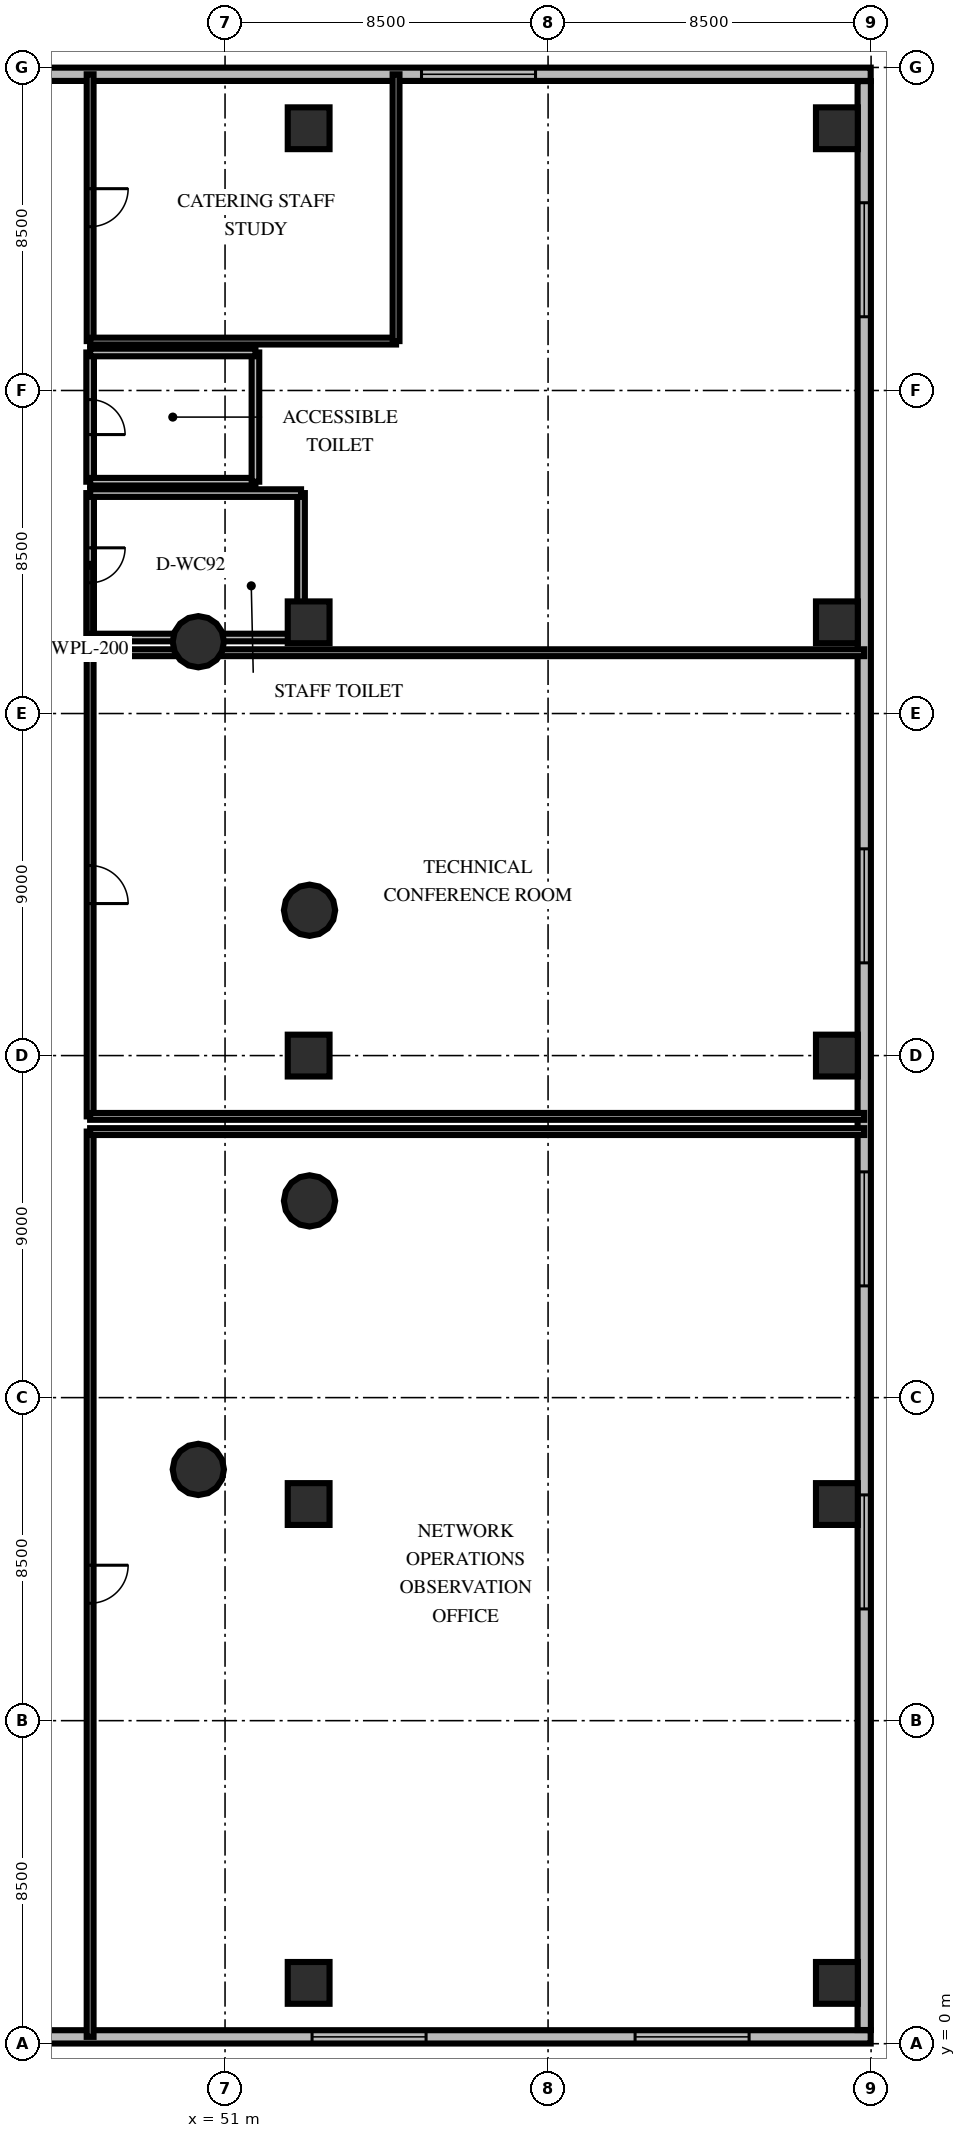
"""IFC4 building model, lengths in metres.
Left out: names, types, materials, properties, quantities, classifications, styles, units other than length and angle.
Written with IfcOpenShell. Run it as: python <this file> out.ifc"""

import sys

from ifc_helpers import new_model, si_unit, direction, frame, frame_2d, origin, origin_2d, place, context, subcontext, project, spatial, rectangle, circle, extrude, element, fill, save


model = new_model("IFC4")
c1 = context("Model", 3, precision=1e-05, world=origin(), true_north=direction((0.0, 1.0)))
c2 = subcontext(c1, "Body", "Model", "MODEL_VIEW")
j1 = project(units=[si_unit("LENGTHUNIT", "METRE"), si_unit("PLANEANGLEUNIT", "RADIAN")], contexts=[c1])
p1 = place(None, origin())
s1 = spatial("IfcSite", under=j1, at=p1, CompositionType="ELEMENT")
p2 = place(p1, origin())
s2 = spatial("IfcBuilding", under=s1, at=p2, CompositionType="ELEMENT")
p3 = place(p2, frame((0.0, 0.0, 5.4)))
s3 = spatial("IfcBuildingStorey", under=s2, at=p3, CompositionType="ELEMENT", Elevation=5.4)
for number, where, z_axis, x_axis in (
    (1, (53.2, 1.6, 0.0), (0.0, 0.0, 1.0), (1.0, 0.0, 0.0)),
    (2, (53.2, 14.2, 0.0), (0.0, 0.0, 1.0), (1.0, 0.0, 0.0)),
    (3, (53.2, 26.0, 0.0), (0.0, 0.0, 1.0), (1.0, 0.0, 0.0)),
    (4, (53.2, 37.4, 0.0), (0.0, 0.0, 1.0), (1.0, 0.0, 0.0)),
    (5, (53.2, 50.4, 0.0), (0.0, 0.0, 1.0), (1.0, 0.0, 0.0)),
    (6, (67.1, 1.6, 0.0), (0.0, 0.0, 1.0), (1.0, 0.0, 0.0)),
    (7, (67.1, 14.2, 0.0), (0.0, 0.0, 1.0), (1.0, 0.0, 0.0)),
    (8, (67.1, 26.0, 0.0), (0.0, 0.0, 1.0), (1.0, 0.0, 0.0)),
    (9, (67.1, 37.4, 0.0), (0.0, 0.0, 1.0), (1.0, 0.0, 0.0)),
    (10, (67.1, 50.4, 0.0), (0.0, 0.0, 1.0), (1.0, 0.0, 0.0)),
):
    element("IfcColumn", number, at=place(p3, frame(where, z_axis=z_axis, x_axis=x_axis)), inside=s3, PredefinedType="COLUMN", context=c2, shape_type="SweptSolid", body=[
        extrude(rectangle(XDim=1.1, YDim=1.1, at=origin_2d()), origin(), (0.0, 0.0, 1.0), 4.8),
    ])
for number, where, z_axis, x_axis in (
    (11, (53.223, 29.824, 0.0), (0.0, 0.0, 1.0), (1.0, 0.0, 0.0)),
    (12, (50.297, 36.889, 0.0), (0.0, 0.0, 1.0), (1.0, 0.0, 0.0)),
    (13, (50.297, 15.111, 0.0), (0.0, 0.0, 1.0), (1.0, 0.0, 0.0)),
    (14, (53.223, 22.176, 0.0), (0.0, 0.0, 1.0), (1.0, 0.0, 0.0)),
):
    element("IfcColumn", number, at=place(p3, frame(where, z_axis=z_axis, x_axis=x_axis)), inside=s3, PredefinedType="COLUMN", context=c2, shape_type="SweptSolid", body=[
        extrude(circle(Radius=0.675, at=origin_2d()), origin(), (0.0, 0.0, 1.0), 4.8),
    ])
p4 = place(p3, frame((67.99, 0.18, 0.0), z_axis=(0.0, 0.0, 1.0), x_axis=(-1.0, 0.0, 0.0)))
e15 = element("IfcWall", 15, at=p4, inside=s3, PredefinedType="SOLIDWALL", context=c2, shape_type="SweptSolid", body=[
    extrude(rectangle(XDim=25.37, YDim=0.35, at=frame_2d((12.685, 0.0))), origin(), (0.0, 0.0, 1.0), 3.76),
])
p5 = place(p4, frame((3.2, 0.0, 0.85)))
e16 = element("IfcOpeningElement", 16, at=p5, cuts=e15, PredefinedType="OPENING", context=c2, shape_type="SweptSolid", body=[
    extrude(rectangle(XDim=3.0, YDim=2.4, at=frame_2d((1.5, 1.2))), frame((0.0, 0.185, 0.0), z_axis=(0.0, -1.0, 0.0), x_axis=(1.0, 0.0, 0.0)), (0.0, 0.0, 1.0), 0.37),
])
p6 = place(p4, frame((11.7, 0.0, 0.85)))
e17 = element("IfcOpeningElement", 17, at=p6, cuts=e15, PredefinedType="OPENING", context=c2, shape_type="SweptSolid", body=[
    extrude(rectangle(XDim=3.0, YDim=2.4, at=frame_2d((1.5, 1.2))), frame((0.0, 0.185, 0.0), z_axis=(0.0, -1.0, 0.0), x_axis=(1.0, 0.0, 0.0)), (0.0, 0.0, 1.0), 0.37),
])
p7 = place(p3, frame((67.82, 51.64, 0.0), z_axis=(0.0, 0.0, 1.0), x_axis=(0.0, -1.0, 0.0)))
e18 = element("IfcWall", 18, at=p7, inside=s3, PredefinedType="SOLIDWALL", context=c2, shape_type="SweptSolid", body=[
    extrude(rectangle(XDim=51.28, YDim=0.35, at=frame_2d((25.64, 0.0))), origin(), (0.0, 0.0, 1.0), 3.76),
])
p8 = place(p7, frame((3.2, 0.0, 0.85)))
e19 = element("IfcOpeningElement", 19, at=p8, cuts=e18, PredefinedType="OPENING", context=c2, shape_type="SweptSolid", body=[
    extrude(rectangle(XDim=3.0, YDim=2.4, at=frame_2d((1.5, 1.2))), frame((0.0, 0.185, 0.0), z_axis=(0.0, -1.0, 0.0), x_axis=(1.0, 0.0, 0.0)), (0.0, 0.0, 1.0), 0.37),
])
p9 = place(p7, frame((20.2, 0.0, 0.85)))
e20 = element("IfcOpeningElement", 20, at=p9, cuts=e18, PredefinedType="OPENING", context=c2, shape_type="SweptSolid", body=[
    extrude(rectangle(XDim=3.0, YDim=2.4, at=frame_2d((1.5, 1.2))), frame((0.0, 0.185, 0.0), z_axis=(0.0, -1.0, 0.0), x_axis=(1.0, 0.0, 0.0)), (0.0, 0.0, 1.0), 0.37),
])
p10 = place(p7, frame((28.7, 0.0, 0.85)))
e21 = element("IfcOpeningElement", 21, at=p10, cuts=e18, PredefinedType="OPENING", context=c2, shape_type="SweptSolid", body=[
    extrude(rectangle(XDim=3.0, YDim=2.4, at=frame_2d((1.5, 1.2))), frame((0.0, 0.185, 0.0), z_axis=(0.0, -1.0, 0.0), x_axis=(1.0, 0.0, 0.0)), (0.0, 0.0, 1.0), 0.37),
])
p11 = place(p7, frame((37.2, 0.0, 0.85)))
e22 = element("IfcOpeningElement", 22, at=p11, cuts=e18, PredefinedType="OPENING", context=c2, shape_type="SweptSolid", body=[
    extrude(rectangle(XDim=3.0, YDim=2.4, at=frame_2d((1.5, 1.2))), frame((0.0, 0.185, 0.0), z_axis=(0.0, -1.0, 0.0), x_axis=(1.0, 0.0, 0.0)), (0.0, 0.0, 1.0), 0.37),
])
p12 = place(p3, frame((42.62, 51.82, 0.0), z_axis=(0.0, 0.0, 1.0), x_axis=(1.0, 0.0, 0.0)))
e23 = element("IfcWall", 23, at=p12, inside=s3, PredefinedType="SOLIDWALL", context=c2, shape_type="SweptSolid", body=[
    extrude(rectangle(XDim=25.37, YDim=0.35, at=frame_2d((12.685, 0.0))), origin(), (0.0, 0.0, 1.0), 3.76),
])
p13 = place(p12, frame((13.55, 0.0, 0.85)))
e24 = element("IfcOpeningElement", 24, at=p13, cuts=e23, PredefinedType="OPENING", context=c2, shape_type="SweptSolid", body=[
    extrude(rectangle(XDim=3.0, YDim=2.4, at=frame_2d((1.5, 1.2))), frame((0.0, 0.185, 0.0), z_axis=(0.0, -1.0, 0.0), x_axis=(1.0, 0.0, 0.0)), (0.0, 0.0, 1.0), 0.37),
])
p14 = place(p3, frame((47.45, 24.0, 0.0), z_axis=(0.0, 0.0, 1.0), x_axis=(0.0, -1.0, 0.0)))
e25 = element("IfcWall", 25, at=p14, inside=s3, PredefinedType="PARTITIONING", context=c2, shape_type="SweptSolid", body=[
    extrude(rectangle(XDim=23.82, YDim=0.18, at=frame_2d((11.91, 0.0))), origin(), (0.0, 0.0, 1.0), 3.56),
])
p15 = place(p14, frame((11.41, 0.0, 0.0)))
e26 = element("IfcOpeningElement", 26, at=p15, cuts=e25, PredefinedType="OPENING", context=c2, shape_type="SweptSolid", body=[
    extrude(rectangle(XDim=1.0, YDim=2.15, at=frame_2d((0.5, 1.075))), frame((0.0, 0.1, 0.0), z_axis=(0.0, -1.0, 0.0), x_axis=(1.0, 0.0, 0.0)), (0.0, 0.0, 1.0), 0.2),
])
p16 = place(p3, frame((67.82, 24.0, 0.0), z_axis=(0.0, 0.0, 1.0), x_axis=(-1.0, 0.0, 0.0)))
e27 = element("IfcWall", 27, at=p16, inside=s3, PredefinedType="PARTITIONING", context=c2, shape_type="SweptSolid", body=[
    extrude(rectangle(XDim=20.37, YDim=0.18, at=frame_2d((10.185, 0.0))), origin(), (0.0, 0.0, 1.0), 3.56),
])
p17 = place(p3, frame((47.45, 36.6, 0.0), z_axis=(0.0, 0.0, 1.0), x_axis=(0.0, -1.0, 0.0)))
e28 = element("IfcWall", 28, at=p17, inside=s3, PredefinedType="PARTITIONING", context=c2, shape_type="SweptSolid", body=[
    extrude(rectangle(XDim=12.2, YDim=0.18, at=frame_2d((6.1, 0.0))), origin(), (0.0, 0.0, 1.0), 3.56),
])
p18 = place(p17, frame((5.6, 0.0, 0.0)))
e29 = element("IfcOpeningElement", 29, at=p18, cuts=e28, PredefinedType="OPENING", context=c2, shape_type="SweptSolid", body=[
    extrude(rectangle(XDim=1.0, YDim=2.15, at=frame_2d((0.5, 1.075))), frame((0.0, 0.1, 0.0), z_axis=(0.0, -1.0, 0.0), x_axis=(1.0, 0.0, 0.0)), (0.0, 0.0, 1.0), 0.2),
])
for number, where, z_axis, x_axis in (
    (30, (47.45, 24.4, 0.0), (0.0, 0.0, 1.0), (1.0, 0.0, 0.0)),
    (31, (67.82, 36.6, 0.0), (0.0, 0.0, 1.0), (-1.0, 0.0, 0.0)),
):
    element("IfcWall", number, at=place(p3, frame(where, z_axis=z_axis, x_axis=x_axis)), inside=s3, PredefinedType="PARTITIONING", context=c2, shape_type="SweptSolid", body=[
        extrude(rectangle(XDim=20.37, YDim=0.18, at=frame_2d((10.185, 0.0))), origin(), (0.0, 0.0, 1.0), 3.56),
    ])
p19 = place(p3, frame((47.45, 40.8, 0.0), z_axis=(0.0, 0.0, 1.0), x_axis=(0.0, -1.0, 0.0)))
e32 = element("IfcWall", 32, at=p19, inside=s3, PredefinedType="PLUMBINGWALL", context=c2, shape_type="SweptSolid", body=[
    extrude(rectangle(XDim=3.8, YDim=0.2, at=frame_2d((1.9, 0.0))), origin(), (0.0, 0.0, 1.0), 3.56),
])
p20 = place(p19, frame((1.44, 0.0, 0.0)))
e33 = element("IfcOpeningElement", 33, at=p20, cuts=e32, PredefinedType="OPENING", context=c2, shape_type="SweptSolid", body=[
    extrude(rectangle(XDim=0.92, YDim=2.1, at=frame_2d((0.46, 1.05))), frame((0.0, 0.11, 0.0), z_axis=(0.0, -1.0, 0.0), x_axis=(1.0, 0.0, 0.0)), (0.0, 0.0, 1.0), 0.22),
])
p21 = place(p3, frame((47.45, 37.0, 0.0), z_axis=(0.0, 0.0, 1.0), x_axis=(1.0, 0.0, 0.0)))
e34 = element("IfcWall", 34, at=p21, inside=s3, PredefinedType="PLUMBINGWALL", context=c2, shape_type="SweptSolid", body=[
    extrude(rectangle(XDim=5.55, YDim=0.2, at=frame_2d((2.775, 0.0))), origin(), (0.0, 0.0, 1.0), 3.56),
])
p22 = place(p3, frame((53.0, 37.0, 0.0), z_axis=(0.0, 0.0, 1.0), x_axis=(0.0, 1.0, 0.0)))
e35 = element("IfcWall", 35, at=p22, inside=s3, PredefinedType="PLUMBINGWALL", context=c2, shape_type="SweptSolid", body=[
    extrude(rectangle(XDim=3.8, YDim=0.2, at=frame_2d((1.9, 0.0))), origin(), (0.0, 0.0, 1.0), 3.56),
])
p23 = place(p3, frame((53.0, 40.8, 0.0), z_axis=(0.0, 0.0, 1.0), x_axis=(-1.0, 0.0, 0.0)))
e36 = element("IfcWall", 36, at=p23, inside=s3, PredefinedType="PLUMBINGWALL", context=c2, shape_type="SweptSolid", body=[
    extrude(rectangle(XDim=5.55, YDim=0.2, at=frame_2d((2.775, 0.0))), origin(), (0.0, 0.0, 1.0), 3.56),
])
p24 = place(p3, frame((47.45, 44.5, 0.0), z_axis=(0.0, 0.0, 1.0), x_axis=(0.0, -1.0, 0.0)))
e37 = element("IfcWall", 37, at=p24, inside=s3, PredefinedType="PLUMBINGWALL", context=c2, shape_type="SweptSolid", body=[
    extrude(rectangle(XDim=3.4, YDim=0.2, at=frame_2d((1.7, 0.0))), origin(), (0.0, 0.0, 1.0), 3.56),
])
p25 = place(p24, frame((1.24, 0.0, 0.0)))
e38 = element("IfcOpeningElement", 38, at=p25, cuts=e37, PredefinedType="OPENING", context=c2, shape_type="SweptSolid", body=[
    extrude(rectangle(XDim=0.92, YDim=2.1, at=frame_2d((0.46, 1.05))), frame((0.0, 0.11, 0.0), z_axis=(0.0, -1.0, 0.0), x_axis=(1.0, 0.0, 0.0)), (0.0, 0.0, 1.0), 0.22),
])
p26 = place(p3, frame((47.45, 41.1, 0.0), z_axis=(0.0, 0.0, 1.0), x_axis=(1.0, 0.0, 0.0)))
e39 = element("IfcWall", 39, at=p26, inside=s3, PredefinedType="PLUMBINGWALL", context=c2, shape_type="SweptSolid", body=[
    extrude(rectangle(XDim=4.35, YDim=0.2, at=frame_2d((2.175, 0.0))), origin(), (0.0, 0.0, 1.0), 3.56),
])
p27 = place(p3, frame((51.8, 41.1, 0.0), z_axis=(0.0, 0.0, 1.0), x_axis=(0.0, 1.0, 0.0)))
e40 = element("IfcWall", 40, at=p27, inside=s3, PredefinedType="PLUMBINGWALL", context=c2, shape_type="SweptSolid", body=[
    extrude(rectangle(XDim=3.4, YDim=0.2, at=frame_2d((1.7, 0.0))), origin(), (0.0, 0.0, 1.0), 3.56),
])
p28 = place(p3, frame((51.8, 44.5, 0.0), z_axis=(0.0, 0.0, 1.0), x_axis=(-1.0, 0.0, 0.0)))
e41 = element("IfcWall", 41, at=p28, inside=s3, PredefinedType="PLUMBINGWALL", context=c2, shape_type="SweptSolid", body=[
    extrude(rectangle(XDim=4.35, YDim=0.2, at=frame_2d((2.175, 0.0))), origin(), (0.0, 0.0, 1.0), 3.56),
])
p29 = place(p3, frame((47.45, 51.82, 0.0), z_axis=(0.0, 0.0, 1.0), x_axis=(0.0, -1.0, 0.0)))
e42 = element("IfcWall", 42, at=p29, inside=s3, PredefinedType="PARTITIONING", context=c2, shape_type="SweptSolid", body=[
    extrude(rectangle(XDim=7.02, YDim=0.18, at=frame_2d((3.51, 0.0))), origin(), (0.0, 0.0, 1.0), 3.56),
])
p30 = place(p29, frame((3.01, 0.0, 0.0)))
e43 = element("IfcOpeningElement", 43, at=p30, cuts=e42, PredefinedType="OPENING", context=c2, shape_type="SweptSolid", body=[
    extrude(rectangle(XDim=1.0, YDim=2.15, at=frame_2d((0.5, 1.075))), frame((0.0, 0.1, 0.0), z_axis=(0.0, -1.0, 0.0), x_axis=(1.0, 0.0, 0.0)), (0.0, 0.0, 1.0), 0.2),
])
p31 = place(p3, frame((47.45, 44.8, 0.0), z_axis=(0.0, 0.0, 1.0), x_axis=(1.0, 0.0, 0.0)))
e44 = element("IfcWall", 44, at=p31, inside=s3, PredefinedType="PARTITIONING", context=c2, shape_type="SweptSolid", body=[
    extrude(rectangle(XDim=8.05, YDim=0.18, at=frame_2d((4.025, 0.0))), origin(), (0.0, 0.0, 1.0), 3.56),
])
p32 = place(p3, frame((55.5, 44.8, 0.0), z_axis=(0.0, 0.0, 1.0), x_axis=(0.0, 1.0, 0.0)))
e45 = element("IfcWall", 45, at=p32, inside=s3, PredefinedType="PARTITIONING", context=c2, shape_type="SweptSolid", body=[
    extrude(rectangle(XDim=7.02, YDim=0.18, at=frame_2d((3.51, 0.0))), origin(), (0.0, 0.0, 1.0), 3.56),
])
p33 = place(p5, origin())
e46 = element("IfcWindow", 46, at=p33, inside=s3, PartitioningType="SINGLE_PANEL", PredefinedType="WINDOW", context=c2, shape_type="SweptSolid", body=[
    extrude(rectangle(XDim=3.0, YDim=2.4, at=frame_2d((1.5, 1.2))), frame((0.0, 0.03, 0.0), z_axis=(0.0, -1.0, 0.0), x_axis=(1.0, 0.0, 0.0)), (0.0, 0.0, 1.0), 0.06),
])
fill(e16, e46)
p34 = place(p6, origin())
e47 = element("IfcWindow", 47, at=p34, inside=s3, PartitioningType="SINGLE_PANEL", PredefinedType="WINDOW", context=c2, shape_type="SweptSolid", body=[
    extrude(rectangle(XDim=3.0, YDim=2.4, at=frame_2d((1.5, 1.2))), frame((0.0, 0.03, 0.0), z_axis=(0.0, -1.0, 0.0), x_axis=(1.0, 0.0, 0.0)), (0.0, 0.0, 1.0), 0.06),
])
fill(e17, e47)
p35 = place(p8, origin())
e48 = element("IfcWindow", 48, at=p35, inside=s3, PartitioningType="SINGLE_PANEL", PredefinedType="WINDOW", context=c2, shape_type="SweptSolid", body=[
    extrude(rectangle(XDim=3.0, YDim=2.4, at=frame_2d((1.5, 1.2))), frame((0.0, 0.03, 0.0), z_axis=(0.0, -1.0, 0.0), x_axis=(1.0, 0.0, 0.0)), (0.0, 0.0, 1.0), 0.06),
])
fill(e19, e48)
p36 = place(p9, origin())
e49 = element("IfcWindow", 49, at=p36, inside=s3, PartitioningType="SINGLE_PANEL", PredefinedType="WINDOW", context=c2, shape_type="SweptSolid", body=[
    extrude(rectangle(XDim=3.0, YDim=2.4, at=frame_2d((1.5, 1.2))), frame((0.0, 0.03, 0.0), z_axis=(0.0, -1.0, 0.0), x_axis=(1.0, 0.0, 0.0)), (0.0, 0.0, 1.0), 0.06),
])
fill(e20, e49)
p37 = place(p10, origin())
e50 = element("IfcWindow", 50, at=p37, inside=s3, PartitioningType="SINGLE_PANEL", PredefinedType="WINDOW", context=c2, shape_type="SweptSolid", body=[
    extrude(rectangle(XDim=3.0, YDim=2.4, at=frame_2d((1.5, 1.2))), frame((0.0, 0.03, 0.0), z_axis=(0.0, -1.0, 0.0), x_axis=(1.0, 0.0, 0.0)), (0.0, 0.0, 1.0), 0.06),
])
fill(e21, e50)
p38 = place(p11, origin())
e51 = element("IfcWindow", 51, at=p38, inside=s3, PartitioningType="SINGLE_PANEL", PredefinedType="WINDOW", context=c2, shape_type="SweptSolid", body=[
    extrude(rectangle(XDim=3.0, YDim=2.4, at=frame_2d((1.5, 1.2))), frame((0.0, 0.03, 0.0), z_axis=(0.0, -1.0, 0.0), x_axis=(1.0, 0.0, 0.0)), (0.0, 0.0, 1.0), 0.06),
])
fill(e22, e51)
p39 = place(p13, origin())
e52 = element("IfcWindow", 52, at=p39, inside=s3, PartitioningType="SINGLE_PANEL", PredefinedType="WINDOW", context=c2, shape_type="SweptSolid", body=[
    extrude(rectangle(XDim=3.0, YDim=2.4, at=frame_2d((1.5, 1.2))), frame((0.0, 0.03, 0.0), z_axis=(0.0, -1.0, 0.0), x_axis=(1.0, 0.0, 0.0)), (0.0, 0.0, 1.0), 0.06),
])
fill(e24, e52)
p40 = place(p15, origin())
e53 = element("IfcDoor", 53, at=p40, inside=s3, OperationType="SINGLE_SWING_LEFT", PredefinedType="DOOR", context=c2, shape_type="SweptSolid", body=[
    extrude(rectangle(XDim=1.0, YDim=2.15, at=frame_2d((0.5, 1.075))), frame((0.0, 0.025, 0.0), z_axis=(0.0, -1.0, 0.0), x_axis=(1.0, 0.0, 0.0)), (0.0, 0.0, 1.0), 0.05),
])
fill(e26, e53)
p41 = place(p18, origin())
e54 = element("IfcDoor", 54, at=p41, inside=s3, OperationType="SINGLE_SWING_RIGHT", PredefinedType="DOOR", context=c2, shape_type="SweptSolid", body=[
    extrude(rectangle(XDim=1.0, YDim=2.15, at=frame_2d((0.5, 1.075))), frame((0.0, 0.025, 0.0), z_axis=(0.0, -1.0, 0.0), x_axis=(1.0, 0.0, 0.0)), (0.0, 0.0, 1.0), 0.05),
])
fill(e29, e54)
p42 = place(p20, origin())
e55 = element("IfcDoor", 55, at=p42, inside=s3, OperationType="SINGLE_SWING_LEFT", PredefinedType="DOOR", context=c2, shape_type="SweptSolid", body=[
    extrude(rectangle(XDim=0.92, YDim=2.1, at=frame_2d((0.46, 1.05))), frame((0.0, 0.025, 0.0), z_axis=(0.0, -1.0, 0.0), x_axis=(1.0, 0.0, 0.0)), (0.0, 0.0, 1.0), 0.05),
])
fill(e33, e55)
p43 = place(p25, origin())
e56 = element("IfcDoor", 56, at=p43, inside=s3, OperationType="SINGLE_SWING_RIGHT", PredefinedType="DOOR", context=c2, shape_type="SweptSolid", body=[
    extrude(rectangle(XDim=0.92, YDim=2.1, at=frame_2d((0.46, 1.05))), frame((0.0, 0.025, 0.0), z_axis=(0.0, -1.0, 0.0), x_axis=(1.0, 0.0, 0.0)), (0.0, 0.0, 1.0), 0.05),
])
fill(e38, e56)
p44 = place(p30, origin())
e57 = element("IfcDoor", 57, at=p44, inside=s3, OperationType="SINGLE_SWING_LEFT", PredefinedType="DOOR", context=c2, shape_type="SweptSolid", body=[
    extrude(rectangle(XDim=1.0, YDim=2.15, at=frame_2d((0.5, 1.075))), frame((0.0, 0.025, 0.0), z_axis=(0.0, -1.0, 0.0), x_axis=(1.0, 0.0, 0.0)), (0.0, 0.0, 1.0), 0.05),
])
fill(e43, e57)
save(model, sys.argv[1])
